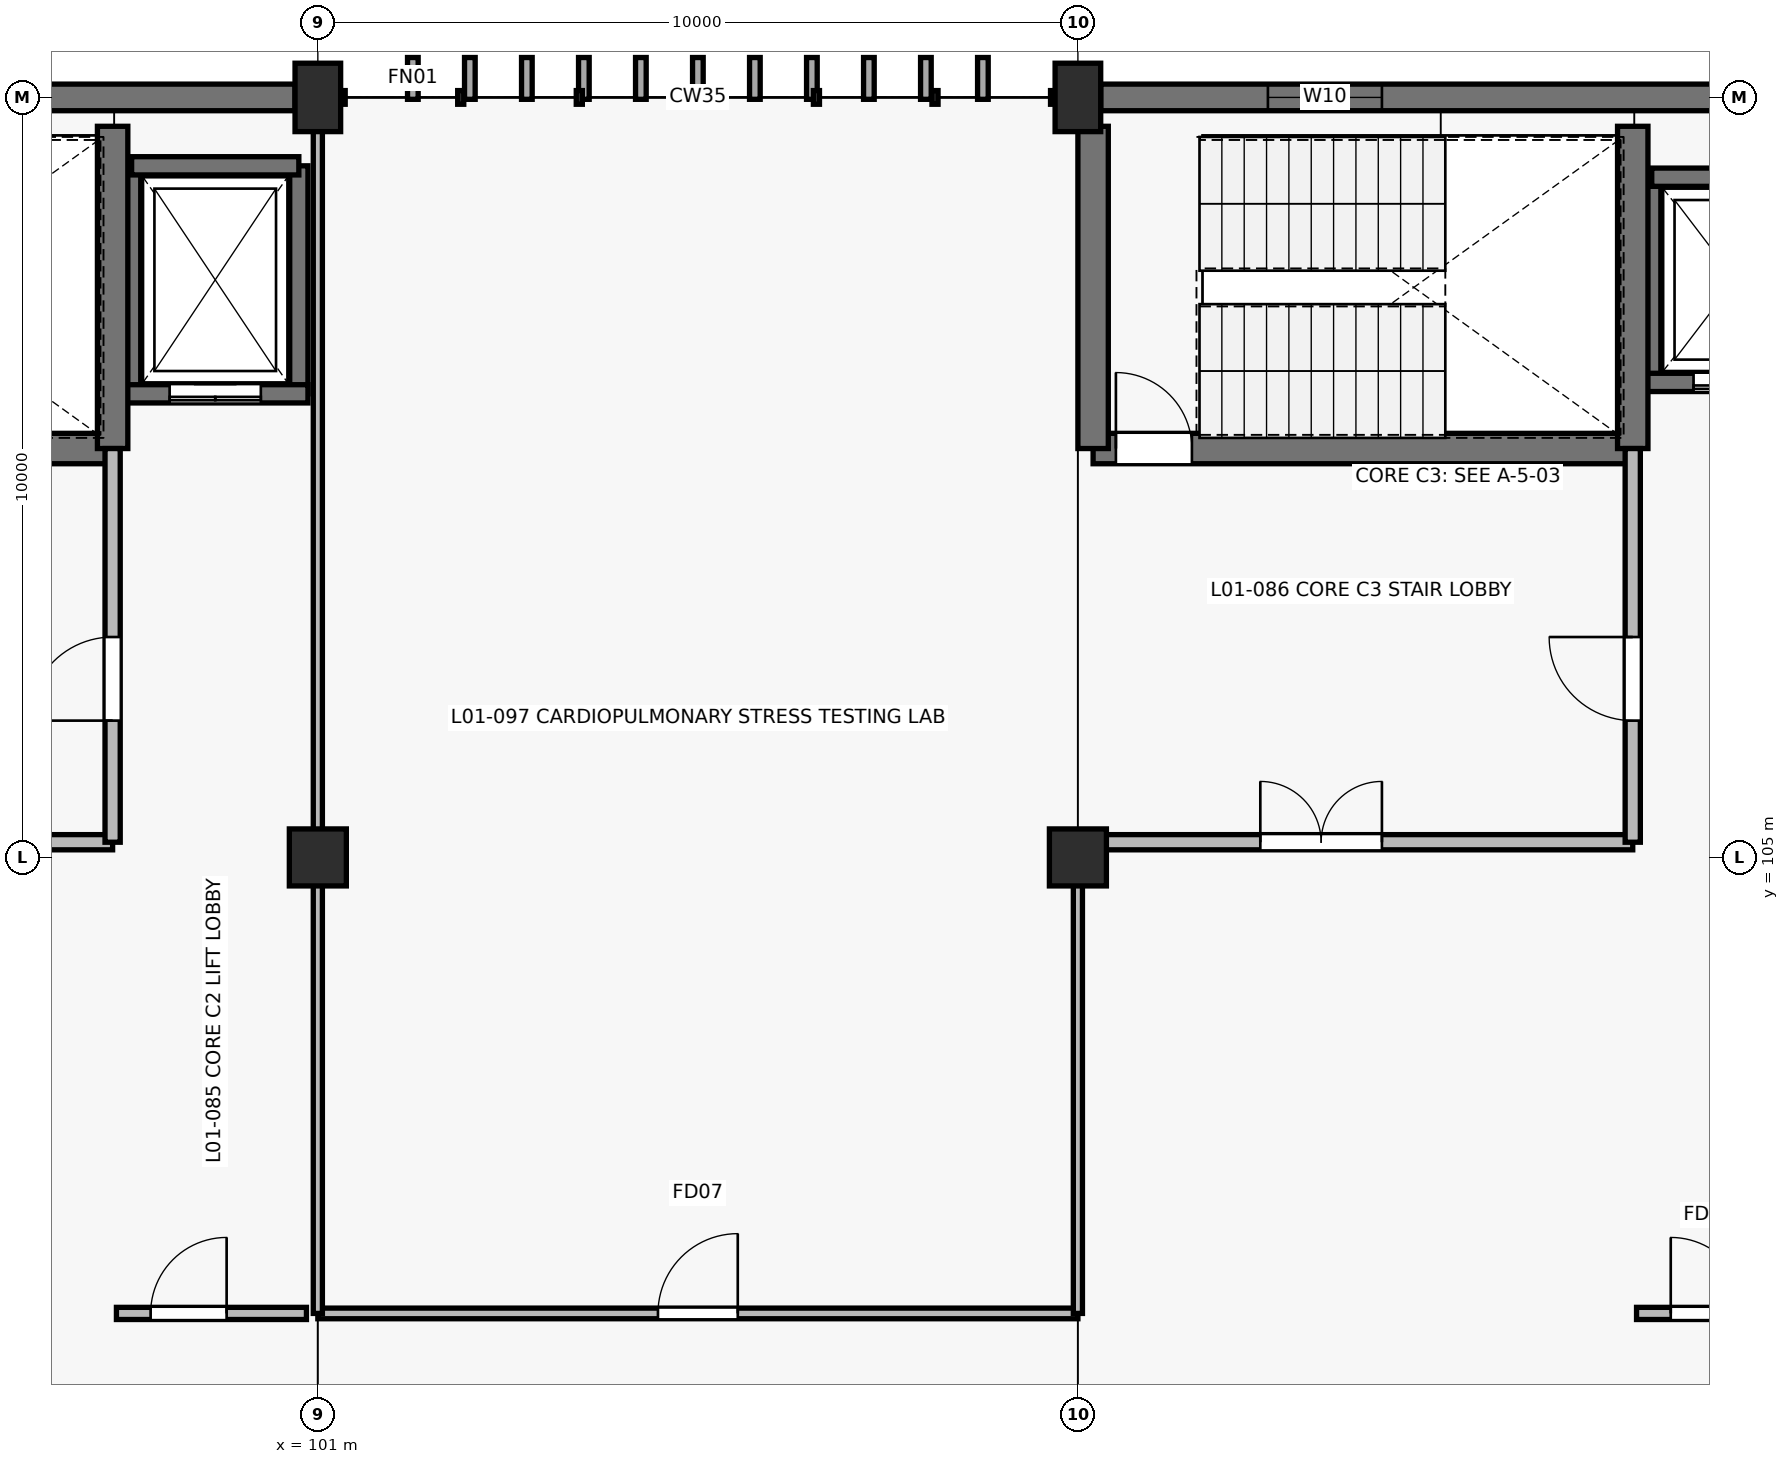
"""IFC4 building model, lengths in metres.
Left out: names, types, materials, properties, quantities, classifications, styles, units other than length and angle.
Written with IfcOpenShell. Run it as: python <this file> out.ifc"""

import sys

from ifc_helpers import new_model, si_unit, direction, frame, frame_2d, origin, origin_2d, place, context, subcontext, project, spatial, rectangle, extrude, element, fill, save


model = new_model("IFC4")
c1 = context("Model", 3, precision=1e-05, world=origin(), true_north=direction((0.0, 1.0)))
c2 = subcontext(c1, "Body", "Model", "MODEL_VIEW")
j1 = project(units=[si_unit("LENGTHUNIT", "METRE"), si_unit("PLANEANGLEUNIT", "RADIAN")], contexts=[c1])
p1 = place(None, origin())
s1 = spatial("IfcSite", under=j1, at=p1, CompositionType="ELEMENT")
p2 = place(p1, origin())
s2 = spatial("IfcBuilding", under=s1, at=p2, CompositionType="ELEMENT")
p3 = place(p2, frame((0.0, 0.0, 4.8)))
s3 = spatial("IfcBuildingStorey", under=s2, at=p3, CompositionType="ELEMENT", Elevation=4.8)
p4 = place(p3, frame((101.0, 105.0, 0.0), z_axis=(0.0, 0.0, 1.0), x_axis=(1.0, 0.0, 0.0)))
e1 = element("IfcColumn", 1, at=p4, inside=s3, PredefinedType="COLUMN", context=c2, shape_type="SweptSolid", body=[
    extrude(rectangle(XDim=0.75, YDim=0.75, at=origin_2d()), origin(), (0.0, 0.0, 1.0), 4.2),
])
p5 = place(p3, frame((101.0, 115.0, 0.0), z_axis=(0.0, 0.0, 1.0), x_axis=(1.0, 0.0, 0.0)))
e2 = element("IfcColumn", 2, at=p5, inside=s3, PredefinedType="COLUMN", context=c2, shape_type="SweptSolid", body=[
    extrude(rectangle(XDim=0.6, YDim=0.9, at=origin_2d()), origin(), (0.0, 0.0, 1.0), 4.2),
])
p6 = place(p3, frame((111.0, 105.0, 0.0), z_axis=(0.0, 0.0, 1.0), x_axis=(1.0, 0.0, 0.0)))
e3 = element("IfcColumn", 3, at=p6, inside=s3, PredefinedType="COLUMN", context=c2, shape_type="SweptSolid", body=[
    extrude(rectangle(XDim=0.75, YDim=0.75, at=origin_2d()), origin(), (0.0, 0.0, 1.0), 4.2),
])
p7 = place(p3, frame((111.0, 115.0, 0.0), z_axis=(0.0, 0.0, 1.0), x_axis=(1.0, 0.0, 0.0)))
e4 = element("IfcColumn", 4, at=p7, inside=s3, PredefinedType="COLUMN", context=c2, shape_type="SweptSolid", body=[
    extrude(rectangle(XDim=0.6, YDim=0.9, at=origin_2d()), origin(), (0.0, 0.0, 1.0), 4.2),
])
p8 = place(p3, frame((91.3, 115.0, 0.0), z_axis=(0.0, 0.0, 1.0), x_axis=(1.0, 0.0, 0.0)))
e5 = element("IfcWall", 5, at=p8, inside=s3, PredefinedType="SOLIDWALL", context=c2, shape_type="SweptSolid", body=[
    extrude(rectangle(XDim=9.4, YDim=0.35, at=frame_2d((4.7, 0.0))), origin(), (0.0, 0.0, 1.0), 4.2),
])
p9 = place(p8, frame((2.2, 0.0, 1.0)))
e6 = element("IfcOpeningElement", 6, at=p9, cuts=e5, PredefinedType="OPENING", context=c2, shape_type="SweptSolid", body=[
    extrude(rectangle(XDim=2.7, YDim=1.5, at=frame_2d((1.35, 0.75))), frame((0.0, 0.185, 0.0), z_axis=(0.0, -1.0, 0.0), x_axis=(1.0, 0.0, 0.0)), (0.0, 0.0, 1.0), 0.37),
])
p10 = place(p3, frame((111.3, 115.0, 0.0), z_axis=(0.0, 0.0, 1.0), x_axis=(1.0, 0.0, 0.0)))
e7 = element("IfcWall", 7, at=p10, inside=s3, PredefinedType="SOLIDWALL", context=c2, shape_type="SweptSolid", body=[
    extrude(rectangle(XDim=9.4, YDim=0.35, at=frame_2d((4.7, 0.0))), origin(), (0.0, 0.0, 1.0), 4.2),
])
p11 = place(p10, frame((2.2, 0.0, 1.0)))
e8 = element("IfcOpeningElement", 8, at=p11, cuts=e7, PredefinedType="OPENING", context=c2, shape_type="SweptSolid", body=[
    extrude(rectangle(XDim=1.5, YDim=1.8, at=frame_2d((0.75, 0.9))), frame((0.0, 0.185, 0.0), z_axis=(0.0, -1.0, 0.0), x_axis=(1.0, 0.0, 0.0)), (0.0, 0.0, 1.0), 0.37),
])
for number, where, z_axis, x_axis in (
    (9, (98.55, 111.1, 0.0), (0.0, 0.0, 1.0), (0.0, 1.0, 0.0)),
    (10, (100.75, 114.1, 0.0), (0.0, 0.0, 1.0), (0.0, -1.0, 0.0)),
):
    element("IfcWall", number, at=place(p3, frame(where, z_axis=z_axis, x_axis=x_axis)), inside=s3, PredefinedType="SHEAR", context=c2, shape_type="SweptSolid", body=[
        extrude(rectangle(XDim=3.0, YDim=0.24, at=frame_2d((1.5, 0.0))), origin(), (0.0, 0.0, 1.0), 4.2),
    ])
p12 = place(p3, frame((98.55, 114.1, 0.0), z_axis=(0.0, 0.0, 1.0), x_axis=(1.0, 0.0, 0.0)))
e11 = element("IfcWall", 11, at=p12, inside=s3, PredefinedType="SHEAR", context=c2, shape_type="SweptSolid", body=[
    extrude(rectangle(XDim=2.2, YDim=0.24, at=frame_2d((1.1, 0.0))), origin(), (0.0, 0.0, 1.0), 4.2),
])
p13 = place(p3, frame((100.87, 111.1, 0.0), z_axis=(0.0, 0.0, 1.0), x_axis=(-1.0, 0.0, 0.0)))
e12 = element("IfcWall", 12, at=p13, inside=s3, PredefinedType="SHEAR", context=c2, shape_type="SweptSolid", body=[
    extrude(rectangle(XDim=2.44, YDim=0.24, at=frame_2d((1.22, 0.0))), origin(), (0.0, 0.0, 1.0), 4.2),
])
p14 = place(p13, frame((0.62, 0.0, 0.0)))
e13 = element("IfcOpeningElement", 13, at=p14, cuts=e12, PredefinedType="OPENING", context=c2, shape_type="SweptSolid", body=[
    extrude(rectangle(XDim=1.2, YDim=2.15, at=frame_2d((0.6, 1.075))), frame((0.0, 0.13, 0.0), z_axis=(0.0, -1.0, 0.0), x_axis=(1.0, 0.0, 0.0)), (0.0, 0.0, 1.0), 0.26),
])
p15 = place(p3, frame((118.55, 111.25, 0.0), z_axis=(0.0, 0.0, 1.0), x_axis=(0.0, 1.0, 0.0)))
e14 = element("IfcWall", 14, at=p15, inside=s3, PredefinedType="SHEAR", context=c2, shape_type="SweptSolid", body=[
    extrude(rectangle(XDim=2.7, YDim=0.24, at=frame_2d((1.35, 0.0))), origin(), (0.0, 0.0, 1.0), 4.2),
])
p16 = place(p3, frame((118.55, 113.95, 0.0), z_axis=(0.0, 0.0, 1.0), x_axis=(1.0, 0.0, 0.0)))
e15 = element("IfcWall", 15, at=p16, inside=s3, PredefinedType="SHEAR", context=c2, shape_type="SweptSolid", body=[
    extrude(rectangle(XDim=2.2, YDim=0.24, at=frame_2d((1.1, 0.0))), origin(), (0.0, 0.0, 1.0), 4.2),
])
p17 = place(p3, frame((120.87, 111.25, 0.0), z_axis=(0.0, 0.0, 1.0), x_axis=(-1.0, 0.0, 0.0)))
e16 = element("IfcWall", 16, at=p17, inside=s3, PredefinedType="SHEAR", context=c2, shape_type="SweptSolid", body=[
    extrude(rectangle(XDim=2.44, YDim=0.24, at=frame_2d((1.22, 0.0))), origin(), (0.0, 0.0, 1.0), 4.2),
])
p18 = place(p17, frame((0.67, 0.0, 0.0)))
e17 = element("IfcOpeningElement", 17, at=p18, cuts=e16, PredefinedType="OPENING", context=c2, shape_type="SweptSolid", body=[
    extrude(rectangle(XDim=1.1, YDim=2.15, at=frame_2d((0.55, 1.075))), frame((0.0, 0.13, 0.0), z_axis=(0.0, -1.0, 0.0), x_axis=(1.0, 0.0, 0.0)), (0.0, 0.0, 1.0), 0.26),
])
p19 = place(p3, frame((91.2, 110.38, 0.0), z_axis=(0.0, 0.0, 1.0), x_axis=(1.0, 0.0, 0.0)))
e18 = element("IfcWall", 18, at=p19, inside=s3, PredefinedType="SHEAR", context=c2, shape_type="SweptSolid", body=[
    extrude(rectangle(XDim=7.1, YDim=0.4, at=frame_2d((3.55, 0.0))), origin(), (0.0, 0.0, 1.0), 4.2),
])
p20 = place(p19, frame((0.3, 0.0, 0.0)))
e19 = element("IfcOpeningElement", 19, at=p20, cuts=e18, PredefinedType="OPENING", context=c2, shape_type="SweptSolid", body=[
    extrude(rectangle(XDim=1.0, YDim=2.15, at=frame_2d((0.5, 1.075))), frame((0.0, 0.21, 0.0), z_axis=(0.0, -1.0, 0.0), x_axis=(1.0, 0.0, 0.0)), (0.0, 0.0, 1.0), 0.42),
])
p21 = place(p3, frame((98.3, 110.38, 0.0), z_axis=(0.0, 0.0, 1.0), x_axis=(0.0, 1.0, 0.0)))
e20 = element("IfcWall", 20, at=p21, inside=s3, PredefinedType="SHEAR", context=c2, shape_type="SweptSolid", body=[
    extrude(rectangle(XDim=4.24, YDim=0.4, at=frame_2d((2.12, 0.0))), origin(), (0.0, 0.0, 1.0), 4.2),
])
p22 = place(p3, frame((91.2, 105.2, 0.0), z_axis=(0.0, 0.0, 1.0), x_axis=(1.0, 0.0, 0.0)))
e21 = element("IfcWall", 21, at=p22, inside=s3, PredefinedType="PARTITIONING", context=c2, shape_type="SweptSolid", body=[
    extrude(rectangle(XDim=7.1, YDim=0.2, at=frame_2d((3.55, 0.0))), origin(), (0.0, 0.0, 1.0), 2.925),
])
p23 = place(p22, frame((2.2, 0.0, 0.0)))
e22 = element("IfcOpeningElement", 22, at=p23, cuts=e21, PredefinedType="OPENING", context=c2, shape_type="SweptSolid", body=[
    extrude(rectangle(XDim=1.6, YDim=2.2, at=frame_2d((0.8, 1.1))), frame((0.0, 0.11, 0.0), z_axis=(0.0, -1.0, 0.0), x_axis=(1.0, 0.0, 0.0)), (0.0, 0.0, 1.0), 0.22),
])
p24 = place(p3, frame((98.3, 105.2, 0.0), z_axis=(0.0, 0.0, 1.0), x_axis=(0.0, 1.0, 0.0)))
e23 = element("IfcWall", 23, at=p24, inside=s3, PredefinedType="PARTITIONING", context=c2, shape_type="SweptSolid", body=[
    extrude(rectangle(XDim=5.18, YDim=0.2, at=frame_2d((2.59, 0.0))), origin(), (0.0, 0.0, 1.0), 3.025),
])
p25 = place(p24, frame((1.6, 0.0, 0.0)))
e24 = element("IfcOpeningElement", 24, at=p25, cuts=e23, PredefinedType="OPENING", context=c2, shape_type="SweptSolid", body=[
    extrude(rectangle(XDim=1.1, YDim=2.15, at=frame_2d((0.55, 1.075))), frame((0.0, 0.11, 0.0), z_axis=(0.0, -1.0, 0.0), x_axis=(1.0, 0.0, 0.0)), (0.0, 0.0, 1.0), 0.22),
])
p26 = place(p3, frame((98.35, 99.0, 0.0), z_axis=(0.0, 0.0, 1.0), x_axis=(1.0, 0.0, 0.0)))
e25 = element("IfcWall", 25, at=p26, inside=s3, PredefinedType="PARTITIONING", context=c2, shape_type="SweptSolid", body=[
    extrude(rectangle(XDim=2.5, YDim=0.16, at=frame_2d((1.25, 0.0))), origin(), (0.0, 0.0, 1.0), 2.925),
])
p27 = place(p26, frame((0.45, 0.0, 0.0)))
e26 = element("IfcOpeningElement", 26, at=p27, cuts=e25, PredefinedType="OPENING", context=c2, shape_type="SweptSolid", body=[
    extrude(rectangle(XDim=1.0, YDim=2.15, at=frame_2d((0.5, 1.075))), frame((0.0, 0.09, 0.0), z_axis=(0.0, -1.0, 0.0), x_axis=(1.0, 0.0, 0.0)), (0.0, 0.0, 1.0), 0.18),
])
p28 = place(p3, frame((111.2, 110.38, 0.0), z_axis=(0.0, 0.0, 1.0), x_axis=(1.0, 0.0, 0.0)))
e27 = element("IfcWall", 27, at=p28, inside=s3, PredefinedType="SHEAR", context=c2, shape_type="SweptSolid", body=[
    extrude(rectangle(XDim=7.1, YDim=0.4, at=frame_2d((3.55, 0.0))), origin(), (0.0, 0.0, 1.0), 4.2),
])
p29 = place(p28, frame((0.3, 0.0, 0.0)))
e28 = element("IfcOpeningElement", 28, at=p29, cuts=e27, PredefinedType="OPENING", context=c2, shape_type="SweptSolid", body=[
    extrude(rectangle(XDim=1.0, YDim=2.15, at=frame_2d((0.5, 1.075))), frame((0.0, 0.21, 0.0), z_axis=(0.0, -1.0, 0.0), x_axis=(1.0, 0.0, 0.0)), (0.0, 0.0, 1.0), 0.42),
])
for number, where, z_axis, x_axis in (
    (29, (118.3, 110.38, 0.0), (0.0, 0.0, 1.0), (0.0, 1.0, 0.0)),
    (30, (111.2, 114.62, 0.0), (0.0, 0.0, 1.0), (0.0, -1.0, 0.0)),
):
    element("IfcWall", number, at=place(p3, frame(where, z_axis=z_axis, x_axis=x_axis)), inside=s3, PredefinedType="SHEAR", context=c2, shape_type="SweptSolid", body=[
        extrude(rectangle(XDim=4.24, YDim=0.4, at=frame_2d((2.12, 0.0))), origin(), (0.0, 0.0, 1.0), 4.2),
    ])
p30 = place(p3, frame((111.2, 105.2, 0.0), z_axis=(0.0, 0.0, 1.0), x_axis=(1.0, 0.0, 0.0)))
e31 = element("IfcWall", 31, at=p30, inside=s3, PredefinedType="PARTITIONING", context=c2, shape_type="SweptSolid", body=[
    extrude(rectangle(XDim=7.1, YDim=0.2, at=frame_2d((3.55, 0.0))), origin(), (0.0, 0.0, 1.0), 2.925),
])
p31 = place(p30, frame((2.2, 0.0, 0.0)))
e32 = element("IfcOpeningElement", 32, at=p31, cuts=e31, PredefinedType="OPENING", context=c2, shape_type="SweptSolid", body=[
    extrude(rectangle(XDim=1.6, YDim=2.2, at=frame_2d((0.8, 1.1))), frame((0.0, 0.11, 0.0), z_axis=(0.0, -1.0, 0.0), x_axis=(1.0, 0.0, 0.0)), (0.0, 0.0, 1.0), 0.22),
])
p32 = place(p3, frame((118.3, 105.2, 0.0), z_axis=(0.0, 0.0, 1.0), x_axis=(0.0, 1.0, 0.0)))
e33 = element("IfcWall", 33, at=p32, inside=s3, PredefinedType="PARTITIONING", context=c2, shape_type="SweptSolid", body=[
    extrude(rectangle(XDim=5.18, YDim=0.2, at=frame_2d((2.59, 0.0))), origin(), (0.0, 0.0, 1.0), 3.025),
])
p33 = place(p32, frame((1.6, 0.0, 0.0)))
e34 = element("IfcOpeningElement", 34, at=p33, cuts=e33, PredefinedType="OPENING", context=c2, shape_type="SweptSolid", body=[
    extrude(rectangle(XDim=1.1, YDim=2.15, at=frame_2d((0.55, 1.075))), frame((0.0, 0.11, 0.0), z_axis=(0.0, -1.0, 0.0), x_axis=(1.0, 0.0, 0.0)), (0.0, 0.0, 1.0), 0.22),
])
p34 = place(p3, frame((118.35, 99.0, 0.0), z_axis=(0.0, 0.0, 1.0), x_axis=(1.0, 0.0, 0.0)))
e35 = element("IfcWall", 35, at=p34, inside=s3, PredefinedType="PARTITIONING", context=c2, shape_type="SweptSolid", body=[
    extrude(rectangle(XDim=2.5, YDim=0.16, at=frame_2d((1.25, 0.0))), origin(), (0.0, 0.0, 1.0), 2.925),
])
p35 = place(p34, frame((0.45, 0.0, 0.0)))
e36 = element("IfcOpeningElement", 36, at=p35, cuts=e35, PredefinedType="OPENING", context=c2, shape_type="SweptSolid", body=[
    extrude(rectangle(XDim=1.0, YDim=2.15, at=frame_2d((0.5, 1.075))), frame((0.0, 0.09, 0.0), z_axis=(0.0, -1.0, 0.0), x_axis=(1.0, 0.0, 0.0)), (0.0, 0.0, 1.0), 0.18),
])
p36 = place(p3, frame((101.0, 99.0, 0.0), z_axis=(0.0, 0.0, 1.0), x_axis=(1.0, 0.0, 0.0)))
e37 = element("IfcWall", 37, at=p36, inside=s3, PredefinedType="PARTITIONING", context=c2, shape_type="SweptSolid", body=[
    extrude(rectangle(XDim=10.0, YDim=0.14, at=frame_2d((5.0, 0.0))), origin(), (0.0, 0.0, 1.0), 2.925),
])
p37 = place(p36, frame((4.475, 0.0, 0.0)))
e38 = element("IfcOpeningElement", 38, at=p37, cuts=e37, PredefinedType="OPENING", context=c2, shape_type="SweptSolid", body=[
    extrude(rectangle(XDim=1.05, YDim=2.1, at=frame_2d((0.525, 1.05))), frame((0.0, 0.08, 0.0), z_axis=(0.0, -1.0, 0.0), x_axis=(1.0, 0.0, 0.0)), (0.0, 0.0, 1.0), 0.16),
])
p38 = place(p3, frame((101.0, 99.0, 0.0), z_axis=(0.0, 0.0, 1.0), x_axis=(0.0, 1.0, 0.0)))
e39 = element("IfcWall", 39, at=p38, inside=s3, PredefinedType="PARTITIONING", context=c2, shape_type="SweptSolid", body=[
    extrude(rectangle(XDim=15.75, YDim=0.12, at=frame_2d((7.875, 0.0))), origin(), (0.0, 0.0, 1.0), 2.925),
])
p39 = place(p3, frame((111.0, 99.0, 0.0), z_axis=(0.0, 0.0, 1.0), x_axis=(0.0, 1.0, 0.0)))
e40 = element("IfcWall", 40, at=p39, inside=s3, PredefinedType="PARTITIONING", context=c2, shape_type="SweptSolid", body=[
    extrude(rectangle(XDim=6.2, YDim=0.12, at=frame_2d((3.1, 0.0))), origin(), (0.0, 0.0, 1.0), 2.925),
])
p40 = place(p11, origin())
e41 = element("IfcWindow", 41, at=p40, inside=s3, PartitioningType="SINGLE_PANEL", PredefinedType="WINDOW", context=c2, shape_type="SweptSolid", body=[
    extrude(rectangle(XDim=1.5, YDim=1.8, at=frame_2d((0.75, 0.9))), frame((0.0, 0.03, 0.0), z_axis=(0.0, -1.0, 0.0), x_axis=(1.0, 0.0, 0.0)), (0.0, 0.0, 1.0), 0.06),
])
fill(e8, e41)
p41 = place(p14, origin())
e42 = element("IfcDoor", 42, at=p41, inside=s3, OperationType="DOUBLE_DOOR_SLIDING", PredefinedType="USERDEFINED", context=c2, shape_type="SweptSolid", body=[
    extrude(rectangle(XDim=1.2, YDim=2.15, at=frame_2d((0.6, 1.075))), frame((0.0, 0.025, 0.0), z_axis=(0.0, -1.0, 0.0), x_axis=(1.0, 0.0, 0.0)), (0.0, 0.0, 1.0), 0.05),
])
fill(e13, e42)
p42 = place(p18, origin())
e43 = element("IfcDoor", 43, at=p42, inside=s3, OperationType="DOUBLE_DOOR_SLIDING", PredefinedType="USERDEFINED", context=c2, shape_type="SweptSolid", body=[
    extrude(rectangle(XDim=1.1, YDim=2.15, at=frame_2d((0.55, 1.075))), frame((0.0, 0.025, 0.0), z_axis=(0.0, -1.0, 0.0), x_axis=(1.0, 0.0, 0.0)), (0.0, 0.0, 1.0), 0.05),
])
fill(e17, e43)
p43 = place(p25, origin())
e44 = element("IfcDoor", 44, at=p43, inside=s3, OperationType="SINGLE_SWING_LEFT", PredefinedType="DOOR", context=c2, shape_type="SweptSolid", body=[
    extrude(rectangle(XDim=1.1, YDim=2.15, at=frame_2d((0.55, 1.075))), frame((0.0, 0.025, 0.0), z_axis=(0.0, -1.0, 0.0), x_axis=(1.0, 0.0, 0.0)), (0.0, 0.0, 1.0), 0.05),
])
fill(e24, e44)
p44 = place(p27, origin())
e45 = element("IfcDoor", 45, at=p44, inside=s3, OperationType="SINGLE_SWING_RIGHT", PredefinedType="DOOR", context=c2, shape_type="SweptSolid", body=[
    extrude(rectangle(XDim=1.0, YDim=2.15, at=frame_2d((0.5, 1.075))), frame((0.0, 0.025, 0.0), z_axis=(0.0, -1.0, 0.0), x_axis=(1.0, 0.0, 0.0)), (0.0, 0.0, 1.0), 0.05),
])
fill(e26, e45)
p45 = place(p29, origin())
e46 = element("IfcDoor", 46, at=p45, inside=s3, OperationType="SINGLE_SWING_LEFT", PredefinedType="DOOR", context=c2, shape_type="SweptSolid", body=[
    extrude(rectangle(XDim=1.0, YDim=2.15, at=frame_2d((0.5, 1.075))), frame((0.0, 0.025, 0.0), z_axis=(0.0, -1.0, 0.0), x_axis=(1.0, 0.0, 0.0)), (0.0, 0.0, 1.0), 0.05),
])
fill(e28, e46)
p46 = place(p31, origin())
e47 = element("IfcDoor", 47, at=p46, inside=s3, OperationType="DOUBLE_DOOR_SINGLE_SWING", PredefinedType="DOOR", context=c2, shape_type="SweptSolid", body=[
    extrude(rectangle(XDim=1.6, YDim=2.2, at=frame_2d((0.8, 1.1))), frame((0.0, 0.025, 0.0), z_axis=(0.0, -1.0, 0.0), x_axis=(1.0, 0.0, 0.0)), (0.0, 0.0, 1.0), 0.05),
])
fill(e32, e47)
p47 = place(p33, origin())
e48 = element("IfcDoor", 48, at=p47, inside=s3, OperationType="SINGLE_SWING_RIGHT", PredefinedType="DOOR", context=c2, shape_type="SweptSolid", body=[
    extrude(rectangle(XDim=1.1, YDim=2.15, at=frame_2d((0.55, 1.075))), frame((0.0, 0.025, 0.0), z_axis=(0.0, -1.0, 0.0), x_axis=(1.0, 0.0, 0.0)), (0.0, 0.0, 1.0), 0.05),
])
fill(e34, e48)
p48 = place(p35, origin())
e49 = element("IfcDoor", 49, at=p48, inside=s3, OperationType="SINGLE_SWING_LEFT", PredefinedType="DOOR", context=c2, shape_type="SweptSolid", body=[
    extrude(rectangle(XDim=1.0, YDim=2.15, at=frame_2d((0.5, 1.075))), frame((0.0, 0.025, 0.0), z_axis=(0.0, -1.0, 0.0), x_axis=(1.0, 0.0, 0.0)), (0.0, 0.0, 1.0), 0.05),
])
fill(e36, e49)
p49 = place(p37, origin())
e50 = element("IfcDoor", 50, at=p49, inside=s3, OperationType="SINGLE_SWING_RIGHT", PredefinedType="DOOR", context=c2, shape_type="SweptSolid", body=[
    extrude(rectangle(XDim=1.05, YDim=2.1, at=frame_2d((0.525, 1.05))), frame((0.0, 0.025, 0.0), z_axis=(0.0, -1.0, 0.0), x_axis=(1.0, 0.0, 0.0)), (0.0, 0.0, 1.0), 0.05),
])
fill(e38, e50)
save(model, sys.argv[1])
